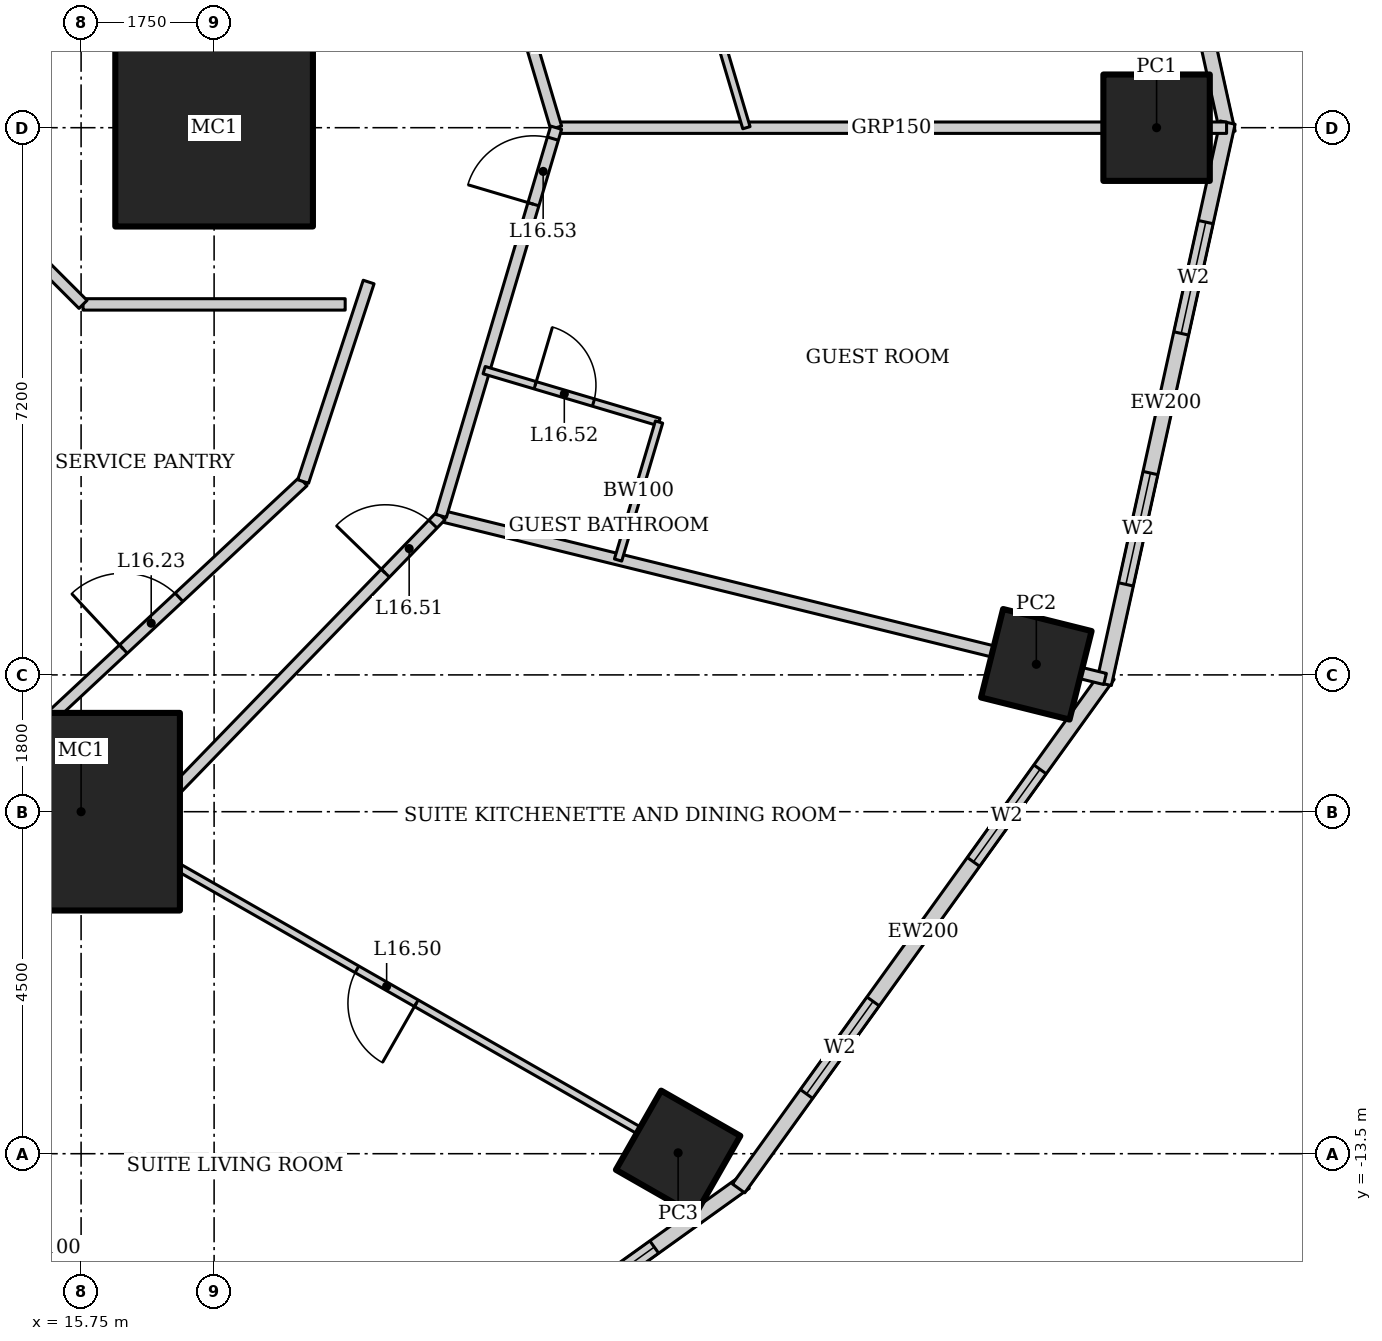
"""IFC4 building model, lengths in metres.
Left out: names, types, materials, properties, quantities, classifications, styles, units other than length and angle.
Written with IfcOpenShell. Run it as: python <this file> out.ifc"""

import sys

from ifc_helpers import new_model, si_unit, direction, frame, frame_2d, origin, origin_2d, place, context, subcontext, project, spatial, rectangle, hollow_rectangle, extrude, element, fill, save


model = new_model("IFC4")
c1 = context("Model", 3, precision=1e-05, world=origin(), true_north=direction((0.0, 1.0)))
c2 = subcontext(c1, "Body", "Model", "MODEL_VIEW")
j1 = project(units=[si_unit("LENGTHUNIT", "METRE"), si_unit("PLANEANGLEUNIT", "RADIAN")], contexts=[c1])
p1 = place(None, origin())
s1 = spatial("IfcSite", under=j1, at=p1, CompositionType="ELEMENT")
p2 = place(p1, origin())
s2 = spatial("IfcBuilding", under=s1, at=p2, CompositionType="ELEMENT")
p3 = place(p2, frame((0.0, 0.0, 73.0)))
s3 = spatial("IfcBuildingStorey", under=s2, at=p3, CompositionType="ELEMENT", Elevation=73.0)
for number, where, z_axis, x_axis in (
    (1, (17.5, 0.0, 0.0), (0.0, 0.0, 1.0), (1.0, 0.0, 0.0)),
    (2, (15.75, -9.0, 0.0), (0.0, 0.0, 1.0), (1.0, 0.0, 0.0)),
):
    element("IfcColumn", number, at=place(p3, frame(where, z_axis=z_axis, x_axis=x_axis)), inside=s3, PredefinedType="COLUMN", context=c2, shape_type="SweptSolid", body=[
        extrude(hollow_rectangle(XDim=2.6, YDim=2.6, WallThickness=0.13, at=origin_2d()), origin(), (0.0, 0.0, 1.0), 3.6),
    ])
p4 = place(p3, frame((29.9, 0.0, 0.0), z_axis=(0.0, 0.0, 1.0), x_axis=(1.0, 0.0, 0.0)))
e3 = element("IfcColumn", 3, at=p4, inside=s3, PredefinedType="COLUMN", context=c2, shape_type="SweptSolid", body=[
    extrude(hollow_rectangle(XDim=1.4, YDim=1.4, WallThickness=0.1, at=origin_2d()), origin(), (0.0, 0.0, 1.0), 3.6),
])
p5 = place(p3, frame((23.605, -13.489, 0.0), z_axis=(0.0, 0.0, 1.0), x_axis=(0.496139221777, 0.86824298017, 0.0)))
e4 = element("IfcColumn", 4, at=p5, inside=s3, PredefinedType="COLUMN", context=c2, shape_type="SweptSolid", body=[
    extrude(hollow_rectangle(XDim=1.2, YDim=1.2, WallThickness=0.12, at=origin_2d()), origin(), (0.0, 0.0, 1.0), 3.6),
])
p6 = place(p3, frame((28.318, -7.06, 0.0), z_axis=(0.0, 0.0, 1.0), x_axis=(0.2419218956, 0.970295726276, 0.0)))
e5 = element("IfcColumn", 5, at=p6, inside=s3, PredefinedType="COLUMN", context=c2, shape_type="SweptSolid", body=[
    extrude(hollow_rectangle(XDim=1.2, YDim=1.2, WallThickness=0.1, at=origin_2d()), origin(), (0.0, 0.0, 1.0), 3.6),
])
p7 = place(p3, frame((30.835, -0.067, 0.0), z_axis=(0.0, 0.0, 1.0), x_axis=(-0.215238065514, 0.976561608478, 0.0)))
e6 = element("IfcWall", 6, at=p7, inside=s3, PredefinedType="SOLIDWALL", context=c2, shape_type="SweptSolid", body=[
    extrude(rectangle(XDim=7.562, YDim=0.2, at=frame_2d((3.781, 0.0))), origin(), (0.0, 0.0, 1.0), 3.45),
])
p8 = place(p7, frame((1.341, 0.0, 0.5)))
e7 = element("IfcOpeningElement", 7, at=p8, cuts=e6, PredefinedType="OPENING", context=c2, shape_type="SweptSolid", body=[
    extrude(rectangle(XDim=1.5, YDim=2.2, at=frame_2d((0.75, 1.1))), frame((0.0, 0.11, 0.0), z_axis=(0.0, -1.0, 0.0), x_axis=(1.0, 0.0, 0.0)), (0.0, 0.0, 1.0), 0.22),
])
p9 = place(p7, frame((4.722, 0.0, 0.5)))
e8 = element("IfcOpeningElement", 8, at=p9, cuts=e6, PredefinedType="OPENING", context=c2, shape_type="SweptSolid", body=[
    extrude(rectangle(XDim=1.5, YDim=2.2, at=frame_2d((0.75, 1.1))), frame((0.0, 0.11, 0.0), z_axis=(0.0, -1.0, 0.0), x_axis=(1.0, 0.0, 0.0)), (0.0, 0.0, 1.0), 0.22),
])
p10 = place(p3, frame((17.929, -18.572, 0.0), z_axis=(0.0, 0.0, 1.0), x_axis=(0.812791321576, 0.582554948112, 0.0)))
e9 = element("IfcWall", 9, at=p10, inside=s3, PredefinedType="SOLIDWALL", context=c2, shape_type="SweptSolid", body=[
    extrude(rectangle(XDim=8.063, YDim=0.2, at=frame_2d((4.032, 0.0))), origin(), (0.0, 0.0, 1.0), 3.45),
])
p11 = place(p10, frame((1.466, 0.0, 0.5)))
e10 = element("IfcOpeningElement", 10, at=p11, cuts=e9, PredefinedType="OPENING", context=c2, shape_type="SweptSolid", body=[
    extrude(rectangle(XDim=1.5, YDim=2.2, at=frame_2d((0.75, 1.1))), frame((0.0, 0.11, 0.0), z_axis=(0.0, -1.0, 0.0), x_axis=(1.0, 0.0, 0.0)), (0.0, 0.0, 1.0), 0.22),
])
p12 = place(p10, frame((5.097, 0.0, 0.5)))
e11 = element("IfcOpeningElement", 11, at=p12, cuts=e9, PredefinedType="OPENING", context=c2, shape_type="SweptSolid", body=[
    extrude(rectangle(XDim=1.5, YDim=2.2, at=frame_2d((0.75, 1.1))), frame((0.0, 0.11, 0.0), z_axis=(0.0, -1.0, 0.0), x_axis=(1.0, 0.0, 0.0)), (0.0, 0.0, 1.0), 0.22),
])
p13 = place(p3, frame((24.4, -13.957, 0.0), z_axis=(0.0, 0.0, 1.0), x_axis=(0.583937613703, 0.811798536155, 0.0)))
e12 = element("IfcWall", 12, at=p13, inside=s3, PredefinedType="SOLIDWALL", context=c2, shape_type="SweptSolid", body=[
    extrude(rectangle(XDim=8.323, YDim=0.2, at=frame_2d((4.162, 0.0))), origin(), (0.0, 0.0, 1.0), 3.45),
])
p14 = place(p13, frame((1.531, 0.0, 0.5)))
e13 = element("IfcOpeningElement", 13, at=p14, cuts=e12, PredefinedType="OPENING", context=c2, shape_type="SweptSolid", body=[
    extrude(rectangle(XDim=1.5, YDim=2.2, at=frame_2d((0.75, 1.1))), frame((0.0, 0.11, 0.0), z_axis=(0.0, -1.0, 0.0), x_axis=(1.0, 0.0, 0.0)), (0.0, 0.0, 1.0), 0.22),
])
p15 = place(p13, frame((5.292, 0.0, 0.5)))
e14 = element("IfcOpeningElement", 14, at=p15, cuts=e12, PredefinedType="OPENING", context=c2, shape_type="SweptSolid", body=[
    extrude(rectangle(XDim=1.5, YDim=2.2, at=frame_2d((0.75, 1.1))), frame((0.0, 0.11, 0.0), z_axis=(0.0, -1.0, 0.0), x_axis=(1.0, 0.0, 0.0)), (0.0, 0.0, 1.0), 0.22),
])
p16 = place(p3, frame((29.208, -7.318, 0.0), z_axis=(0.0, 0.0, 1.0), x_axis=(0.215238065514, 0.976561608478, 0.0)))
e15 = element("IfcWall", 15, at=p16, inside=s3, PredefinedType="SOLIDWALL", context=c2, shape_type="SweptSolid", body=[
    extrude(rectangle(XDim=7.562, YDim=0.2, at=frame_2d((3.781, 0.0))), origin(), (0.0, 0.0, 1.0), 3.45),
])
p17 = place(p16, frame((1.341, 0.0, 0.5)))
e16 = element("IfcOpeningElement", 16, at=p17, cuts=e15, PredefinedType="OPENING", context=c2, shape_type="SweptSolid", body=[
    extrude(rectangle(XDim=1.5, YDim=2.2, at=frame_2d((0.75, 1.1))), frame((0.0, 0.11, 0.0), z_axis=(0.0, -1.0, 0.0), x_axis=(1.0, 0.0, 0.0)), (0.0, 0.0, 1.0), 0.22),
])
p18 = place(p16, frame((4.722, 0.0, 0.5)))
e17 = element("IfcOpeningElement", 17, at=p18, cuts=e15, PredefinedType="OPENING", context=c2, shape_type="SweptSolid", body=[
    extrude(rectangle(XDim=1.5, YDim=2.2, at=frame_2d((0.75, 1.1))), frame((0.0, 0.11, 0.0), z_axis=(0.0, -1.0, 0.0), x_axis=(1.0, 0.0, 0.0)), (0.0, 0.0, 1.0), 0.22),
])
p19 = place(p3, frame((30.821, 0.0, 0.0), z_axis=(0.0, 0.0, 1.0), x_axis=(-1.0, 0.0, 0.0)))
e18 = element("IfcWall", 18, at=p19, inside=s3, PredefinedType="PARTITIONING", context=c2, shape_type="SweptSolid", body=[
    extrude(rectangle(XDim=8.821, YDim=0.15, at=frame_2d((4.41, 0.0))), origin(), (0.0, 0.0, 1.0), 2.528),
])
p20 = place(p3, frame((29.222, -7.254, 0.0), z_axis=(0.0, 0.0, 1.0), x_axis=(-0.971128703136, 0.238556160989, 0.0)))
e19 = element("IfcWall", 19, at=p20, inside=s3, PredefinedType="PARTITIONING", context=c2, shape_type="SweptSolid", body=[
    extrude(rectangle(XDim=8.998, YDim=0.15, at=frame_2d((4.499, 0.0))), origin(), (0.0, 0.0, 1.0), 2.333),
])
p21 = place(p3, frame((22.0, 0.0, 0.0), z_axis=(0.0, 0.0, 1.0), x_axis=(-0.284584469409, 0.95865096869, 0.0)))
e20 = element("IfcWall", 20, at=p21, inside=s3, PredefinedType="PARTITIONING", context=c2, shape_type="SweptSolid", body=[
    extrude(rectangle(XDim=5.327, YDim=0.15, at=frame_2d((2.664, 0.0))), origin(), (0.0, 0.0, 1.0), 3.45),
])
p22 = place(p3, frame((11.519, -11.928, 0.0), z_axis=(0.0, 0.0, 1.0), x_axis=(0.883334368785, 0.468743419071, 0.0)))
e21 = element("IfcWall", 21, at=p22, inside=s3, PredefinedType="PARTITIONING", context=c2, shape_type="SweptSolid", body=[
    extrude(rectangle(XDim=5.491, YDim=0.15, at=frame_2d((2.746, 0.0))), origin(), (0.0, 0.0, 1.0), 3.45),
])
p23 = place(p3, frame((16.369, -9.354, 0.0), z_axis=(0.0, 0.0, 1.0), x_axis=(0.695871090686, 0.71816671125, 0.0)))
e22 = element("IfcWall", 22, at=p23, inside=s3, PredefinedType="PARTITIONING", context=c2, shape_type="SweptSolid", body=[
    extrude(rectangle(XDim=5.913, YDim=0.15, at=frame_2d((2.957, 0.0))), origin(), (0.0, 0.0, 1.0), 3.45),
])
p24 = place(p23, frame((4.863, 0.0, 0.0)))
e23 = element("IfcOpeningElement", 23, at=p24, cuts=e22, PredefinedType="OPENING", context=c2, shape_type="SweptSolid", body=[
    extrude(rectangle(XDim=0.9, YDim=2.1, at=frame_2d((0.45, 1.05))), frame((0.0, 0.085, 0.0), z_axis=(0.0, -1.0, 0.0), x_axis=(1.0, 0.0, 0.0)), (0.0, 0.0, 1.0), 0.17),
])
p25 = place(p3, frame((20.484, -5.107, 0.0), z_axis=(0.0, 0.0, 1.0), x_axis=(0.284584469409, 0.95865096869, 0.0)))
e24 = element("IfcWall", 24, at=p25, inside=s3, PredefinedType="PARTITIONING", context=c2, shape_type="SweptSolid", body=[
    extrude(rectangle(XDim=5.327, YDim=0.15, at=frame_2d((2.664, 0.0))), origin(), (0.0, 0.0, 1.0), 3.45),
])
p26 = place(p25, frame((4.278, 0.0, 0.0)))
e25 = element("IfcOpeningElement", 25, at=p26, cuts=e24, PredefinedType="OPENING", context=c2, shape_type="SweptSolid", body=[
    extrude(rectangle(XDim=0.9, YDim=2.1, at=frame_2d((0.45, 1.05))), frame((0.0, 0.085, 0.0), z_axis=(0.0, -1.0, 0.0), x_axis=(1.0, 0.0, 0.0)), (0.0, 0.0, 1.0), 0.17),
])
p27 = place(p3, frame((14.673, -8.385, 0.0), z_axis=(0.0, 0.0, 1.0), x_axis=(0.731260145007, 0.682098673452, 0.0)))
e26 = element("IfcWall", 26, at=p27, inside=s3, PredefinedType="PARTITIONING", context=c2, shape_type="SweptSolid", body=[
    extrude(rectangle(XDim=5.468, YDim=0.15, at=frame_2d((2.734, 0.0))), origin(), (0.0, 0.0, 1.0), 3.45),
])
p28 = place(p27, frame((2.234, 0.0, 0.0)))
e27 = element("IfcOpeningElement", 27, at=p28, cuts=e26, PredefinedType="OPENING", context=c2, shape_type="SweptSolid", body=[
    extrude(rectangle(XDim=1.0, YDim=2.1, at=frame_2d((0.5, 1.05))), frame((0.0, 0.085, 0.0), z_axis=(0.0, -1.0, 0.0), x_axis=(1.0, 0.0, 0.0)), (0.0, 0.0, 1.0), 0.17),
])
p29 = place(p3, frame((23.732, 2.6, 0.0), z_axis=(0.0, 0.0, 1.0), x_axis=(0.284514277473, -0.958671803025, 0.0)))
e28 = element("IfcWall", 28, at=p29, inside=s3, PredefinedType="PARTITIONING", context=c2, shape_type="SweptSolid", body=[
    extrude(rectangle(XDim=2.712, YDim=0.1, at=frame_2d((1.356, 0.0))), origin(), (0.0, 0.0, 1.0), 3.45),
])
p30 = place(p3, frame((16.944, -17.545, 0.0), z_axis=(0.0, 0.0, 1.0), x_axis=(-0.694666479492, 0.719331969448, 0.0)))
e29 = element("IfcWall", 29, at=p30, inside=s3, PredefinedType="PARTITIONING", context=c2, shape_type="SweptSolid", body=[
    extrude(rectangle(XDim=7.81, YDim=0.1, at=frame_2d((3.905, 0.0))), origin(), (0.0, 0.0, 1.0), 2.528),
])
p31 = place(p30, frame((3.455, 0.0, 0.0)))
e30 = element("IfcOpeningElement", 30, at=p31, cuts=e29, PredefinedType="OPENING", context=c2, shape_type="SweptSolid", body=[
    extrude(rectangle(XDim=0.9, YDim=2.1, at=frame_2d((0.45, 1.05))), frame((0.0, 0.06, 0.0), z_axis=(0.0, -1.0, 0.0), x_axis=(1.0, 0.0, 0.0)), (0.0, 0.0, 1.0), 0.12),
])
p32 = place(p3, frame((23.171, -13.24, 0.0), z_axis=(0.0, 0.0, 1.0), x_axis=(-0.868243142124, 0.496138938357, 0.0)))
e31 = element("IfcWall", 31, at=p32, inside=s3, PredefinedType="PARTITIONING", context=c2, shape_type="SweptSolid", body=[
    extrude(rectangle(XDim=7.834, YDim=0.1, at=frame_2d((3.917, 0.0))), origin(), (0.0, 0.0, 1.0), 2.693),
])
p33 = place(p32, frame((3.467, 0.0, 0.0)))
e32 = element("IfcOpeningElement", 32, at=p33, cuts=e31, PredefinedType="OPENING", context=c2, shape_type="SweptSolid", body=[
    extrude(rectangle(XDim=0.9, YDim=2.1, at=frame_2d((0.45, 1.05))), frame((0.0, 0.06, 0.0), z_axis=(0.0, -1.0, 0.0), x_axis=(1.0, 0.0, 0.0)), (0.0, 0.0, 1.0), 0.12),
])
p34 = place(p3, frame((21.053, -3.19, 0.0), z_axis=(0.0, 0.0, 1.0), x_axis=(0.958667679126, -0.284528172593, 0.0)))
e33 = element("IfcWall", 33, at=p34, inside=s3, PredefinedType="PARTITIONING", context=c2, shape_type="SweptSolid", body=[
    extrude(rectangle(XDim=2.4, YDim=0.1, at=frame_2d((1.2, 0.0))), origin(), (0.0, 0.0, 1.0), 3.45),
])
p35 = place(p34, frame((0.7, 0.0, 0.0)))
e34 = element("IfcOpeningElement", 34, at=p35, cuts=e33, PredefinedType="OPENING", context=c2, shape_type="SweptSolid", body=[
    extrude(rectangle(XDim=0.8, YDim=2.1, at=frame_2d((0.4, 1.05))), frame((0.0, 0.06, 0.0), z_axis=(0.0, -1.0, 0.0), x_axis=(1.0, 0.0, 0.0)), (0.0, 0.0, 1.0), 0.12),
])
p36 = place(p3, frame((23.354, -3.873, 0.0), z_axis=(0.0, 0.0, 1.0), x_axis=(-0.284496480535, -0.958677084613, 0.0)))
e35 = element("IfcWall", 35, at=p36, inside=s3, PredefinedType="PARTITIONING", context=c2, shape_type="SweptSolid", body=[
    extrude(rectangle(XDim=1.894, YDim=0.1, at=frame_2d((0.947, 0.0))), origin(), (0.0, 0.0, 1.0), 3.45),
])
p37 = place(p3, frame((18.672, -4.655, 0.0), z_axis=(0.0, 0.0, 1.0), x_axis=(0.311929965981, 0.950105097515, 0.0)))
e36 = element("IfcWall", 36, at=p37, inside=s3, PredefinedType="PARTITIONING", context=c2, shape_type="SweptSolid", body=[
    extrude(rectangle(XDim=2.763, YDim=0.15, at=frame_2d((1.381, 0.0))), origin(), (0.0, 0.0, 1.0), 3.45),
])
p38 = place(p3, frame((19.225, -2.325, 0.0), z_axis=(0.0, 0.0, 1.0), x_axis=(-1.0, 0.0, 0.0)))
e37 = element("IfcWall", 37, at=p38, inside=s3, PredefinedType="PARTITIONING", context=c2, shape_type="SweptSolid", body=[
    extrude(rectangle(XDim=3.449, YDim=0.15, at=frame_2d((1.725, 0.0))), origin(), (0.0, 0.0, 1.0), 3.45),
])
p39 = place(p3, frame((15.775, -2.325, 0.0), z_axis=(0.0, 0.0, 1.0), x_axis=(-0.707106781187, 0.707106781187, 0.0)))
e38 = element("IfcWall", 38, at=p39, inside=s3, PredefinedType="PARTITIONING", context=c2, shape_type="SweptSolid", body=[
    extrude(rectangle(XDim=0.849, YDim=0.15, at=frame_2d((0.425, 0.0))), origin(), (0.0, 0.0, 1.0), 3.45),
])
p40 = place(p12, origin())
e39 = element("IfcWindow", 39, at=p40, inside=s3, PartitioningType="SINGLE_PANEL", PredefinedType="WINDOW", context=c2, shape_type="SweptSolid", body=[
    extrude(rectangle(XDim=1.5, YDim=2.2, at=frame_2d((0.75, 1.1))), frame((0.0, 0.03, 0.0), z_axis=(0.0, -1.0, 0.0), x_axis=(1.0, 0.0, 0.0)), (0.0, 0.0, 1.0), 0.06),
])
fill(e11, e39)
p41 = place(p14, origin())
e40 = element("IfcWindow", 40, at=p41, inside=s3, PartitioningType="SINGLE_PANEL", PredefinedType="WINDOW", context=c2, shape_type="SweptSolid", body=[
    extrude(rectangle(XDim=1.5, YDim=2.2, at=frame_2d((0.75, 1.1))), frame((0.0, 0.03, 0.0), z_axis=(0.0, -1.0, 0.0), x_axis=(1.0, 0.0, 0.0)), (0.0, 0.0, 1.0), 0.06),
])
fill(e13, e40)
p42 = place(p15, origin())
e41 = element("IfcWindow", 41, at=p42, inside=s3, PartitioningType="SINGLE_PANEL", PredefinedType="WINDOW", context=c2, shape_type="SweptSolid", body=[
    extrude(rectangle(XDim=1.5, YDim=2.2, at=frame_2d((0.75, 1.1))), frame((0.0, 0.03, 0.0), z_axis=(0.0, -1.0, 0.0), x_axis=(1.0, 0.0, 0.0)), (0.0, 0.0, 1.0), 0.06),
])
fill(e14, e41)
p43 = place(p17, origin())
e42 = element("IfcWindow", 42, at=p43, inside=s3, PartitioningType="SINGLE_PANEL", PredefinedType="WINDOW", context=c2, shape_type="SweptSolid", body=[
    extrude(rectangle(XDim=1.5, YDim=2.2, at=frame_2d((0.75, 1.1))), frame((0.0, 0.03, 0.0), z_axis=(0.0, -1.0, 0.0), x_axis=(1.0, 0.0, 0.0)), (0.0, 0.0, 1.0), 0.06),
])
fill(e16, e42)
p44 = place(p18, origin())
e43 = element("IfcWindow", 43, at=p44, inside=s3, PartitioningType="SINGLE_PANEL", PredefinedType="WINDOW", context=c2, shape_type="SweptSolid", body=[
    extrude(rectangle(XDim=1.5, YDim=2.2, at=frame_2d((0.75, 1.1))), frame((0.0, 0.03, 0.0), z_axis=(0.0, -1.0, 0.0), x_axis=(1.0, 0.0, 0.0)), (0.0, 0.0, 1.0), 0.06),
])
fill(e17, e43)
p45 = place(p28, origin())
e44 = element("IfcDoor", 44, at=p45, inside=s3, OperationType="SINGLE_SWING_LEFT", PredefinedType="DOOR", context=c2, shape_type="SweptSolid", body=[
    extrude(rectangle(XDim=1.0, YDim=2.1, at=frame_2d((0.5, 1.05))), frame((0.0, 0.025, 0.0), z_axis=(0.0, -1.0, 0.0), x_axis=(1.0, 0.0, 0.0)), (0.0, 0.0, 1.0), 0.05),
])
fill(e27, e44)
p46 = place(p33, origin())
e45 = element("IfcDoor", 45, at=p46, inside=s3, OperationType="SINGLE_SWING_LEFT", PredefinedType="DOOR", context=c2, shape_type="SweptSolid", body=[
    extrude(rectangle(XDim=0.9, YDim=2.1, at=frame_2d((0.45, 1.05))), frame((0.0, 0.025, 0.0), z_axis=(0.0, -1.0, 0.0), x_axis=(1.0, 0.0, 0.0)), (0.0, 0.0, 1.0), 0.05),
])
fill(e32, e45)
p47 = place(p24, origin())
e46 = element("IfcDoor", 46, at=p47, inside=s3, OperationType="SINGLE_SWING_LEFT", PredefinedType="DOOR", context=c2, shape_type="SweptSolid", body=[
    extrude(rectangle(XDim=0.9, YDim=2.1, at=frame_2d((0.45, 1.05))), frame((0.0, 0.025, 0.0), z_axis=(0.0, -1.0, 0.0), x_axis=(1.0, 0.0, 0.0)), (0.0, 0.0, 1.0), 0.05),
])
fill(e23, e46)
p48 = place(p35, origin())
e47 = element("IfcDoor", 47, at=p48, inside=s3, OperationType="SINGLE_SWING_LEFT", PredefinedType="DOOR", context=c2, shape_type="SweptSolid", body=[
    extrude(rectangle(XDim=0.8, YDim=2.1, at=frame_2d((0.4, 1.05))), frame((0.0, 0.025, 0.0), z_axis=(0.0, -1.0, 0.0), x_axis=(1.0, 0.0, 0.0)), (0.0, 0.0, 1.0), 0.05),
])
fill(e34, e47)
p49 = place(p26, origin())
e48 = element("IfcDoor", 48, at=p49, inside=s3, OperationType="SINGLE_SWING_LEFT", PredefinedType="DOOR", context=c2, shape_type="SweptSolid", body=[
    extrude(rectangle(XDim=0.9, YDim=2.1, at=frame_2d((0.45, 1.05))), frame((0.0, 0.025, 0.0), z_axis=(0.0, -1.0, 0.0), x_axis=(1.0, 0.0, 0.0)), (0.0, 0.0, 1.0), 0.05),
])
fill(e25, e48)
save(model, sys.argv[1])
